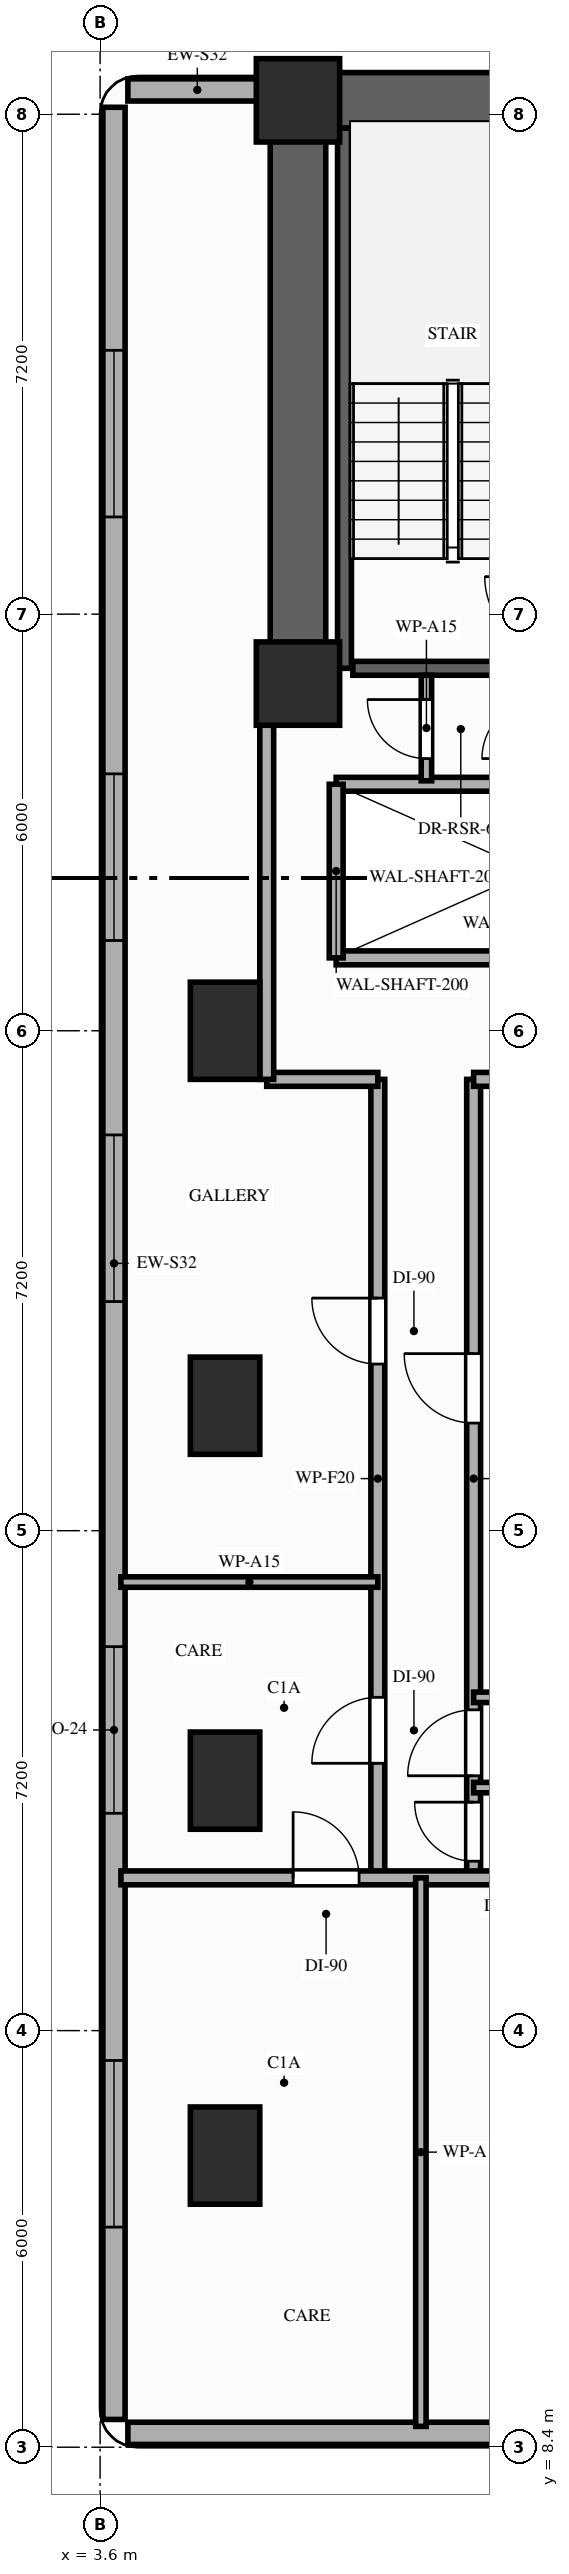
"""IFC4 building model, lengths in metres.
Left out: names, types, materials, properties, quantities, classifications, styles, units other than length and angle.
Written with IfcOpenShell. Run it as: python <this file> out.ifc"""

import sys

from ifc_helpers import new_model, si_unit, direction, frame, frame_2d, origin, origin_2d, place, context, subcontext, project, spatial, rectangle, extrude, element, fill, save


model = new_model("IFC4")
c1 = context("Model", 3, precision=1e-05, world=origin(), true_north=direction((0.0, 1.0)))
c2 = subcontext(c1, "Body", "Model", "MODEL_VIEW")
j1 = project(units=[si_unit("LENGTHUNIT", "METRE"), si_unit("PLANEANGLEUNIT", "RADIAN")], contexts=[c1])
p1 = place(None, origin())
s1 = spatial("IfcSite", under=j1, at=p1, CompositionType="ELEMENT")
p2 = place(p1, origin())
s2 = spatial("IfcBuilding", under=s1, at=p2, CompositionType="ELEMENT")
p3 = place(p2, frame((0.0, 0.0, 33.4)))
s3 = spatial("IfcBuildingStorey", under=s2, at=p3, CompositionType="ELEMENT", Elevation=33.4)
for number, where, z_axis, x_axis in (
    (1, (6.45, 33.8, 0.0), (0.0, 0.0, 1.0), (1.0, 0.0, 0.0)),
    (2, (6.45, 42.2, 0.0), (0.0, 0.0, 1.0), (1.0, 0.0, 0.0)),
):
    element("IfcColumn", number, at=place(p3, frame(where, z_axis=z_axis, x_axis=x_axis)), inside=s3, PredefinedType="COLUMN", context=c2, shape_type="SweptSolid", body=[
        extrude(rectangle(XDim=1.2, YDim=1.2, at=origin_2d()), origin(), (0.0, 0.0, 1.0), 3.2),
    ])
for number, where, z_axis, x_axis in (
    (3, (5.4, 12.6, 0.0), (0.0, 0.0, 1.0), (1.0, 0.0, 0.0)),
    (4, (5.4, 18.0, 0.0), (0.0, 0.0, 1.0), (1.0, 0.0, 0.0)),
    (5, (5.4, 23.4, 0.0), (0.0, 0.0, 1.0), (1.0, 0.0, 0.0)),
    (6, (5.4, 28.8, 0.0), (0.0, 0.0, 1.0), (1.0, 0.0, 0.0)),
):
    element("IfcColumn", number, at=place(p3, frame(where, z_axis=z_axis, x_axis=x_axis)), inside=s3, PredefinedType="COLUMN", context=c2, shape_type="SweptSolid", body=[
        extrude(rectangle(XDim=1.0, YDim=1.4, at=origin_2d()), origin(), (0.0, 0.0, 1.0), 3.2),
    ])
p4 = place(p3, frame((4.0, 8.6, 0.0), z_axis=(0.0, 0.0, 1.0), x_axis=(1.0, 0.0, 0.0)))
e7 = element("IfcWall", 7, at=p4, inside=s3, PredefinedType="STANDARD", context=c2, shape_type="SweptSolid", body=[
    extrude(rectangle(XDim=15.8, YDim=0.32, at=frame_2d((7.9, 0.0))), origin(), (0.0, 0.0, 1.0), 3.02),
])
p5 = place(p4, frame((11.2, 0.0, 0.85)))
e8 = element("IfcOpeningElement", 8, at=p5, cuts=e7, PredefinedType="OPENING", context=c2, shape_type="SweptSolid", body=[
    extrude(rectangle(XDim=2.4, YDim=1.8, at=frame_2d((1.2, 0.9))), frame((0.0, 0.17, 0.0), z_axis=(0.0, -1.0, 0.0), x_axis=(1.0, 0.0, 0.0)), (0.0, 0.0, 1.0), 0.34),
])
p6 = place(p3, frame((3.8, 42.1, 0.0), z_axis=(0.0, 0.0, 1.0), x_axis=(0.0, -1.0, 0.0)))
e9 = element("IfcWall", 9, at=p6, inside=s3, PredefinedType="STANDARD", context=c2, shape_type="SweptSolid", body=[
    extrude(rectangle(XDim=33.3, YDim=0.32, at=frame_2d((16.65, 0.0))), origin(), (0.0, 0.0, 1.0), 2.7),
])
p7 = place(p6, frame((22.17, 0.0, 0.85)))
e10 = element("IfcOpeningElement", 10, at=p7, cuts=e9, PredefinedType="OPENING", context=c2, shape_type="SweptSolid", body=[
    extrude(rectangle(XDim=2.4, YDim=1.6, at=frame_2d((1.2, 0.8))), frame((0.0, 0.17, 0.0), z_axis=(0.0, -1.0, 0.0), x_axis=(1.0, 0.0, 0.0)), (0.0, 0.0, 1.0), 0.34),
])
p8 = place(p6, frame((28.13, 0.0, 0.85)))
e11 = element("IfcOpeningElement", 11, at=p8, cuts=e9, PredefinedType="OPENING", context=c2, shape_type="SweptSolid", body=[
    extrude(rectangle(XDim=2.4, YDim=1.6, at=frame_2d((1.2, 0.8))), frame((0.0, 0.17, 0.0), z_axis=(0.0, -1.0, 0.0), x_axis=(1.0, 0.0, 0.0)), (0.0, 0.0, 1.0), 0.34),
])
p9 = place(p6, frame((14.8, 0.0, 0.85)))
e12 = element("IfcOpeningElement", 12, at=p9, cuts=e9, PredefinedType="OPENING", context=c2, shape_type="SweptSolid", body=[
    extrude(rectangle(XDim=2.4, YDim=1.6, at=frame_2d((1.2, 0.8))), frame((0.0, 0.17, 0.0), z_axis=(0.0, -1.0, 0.0), x_axis=(1.0, 0.0, 0.0)), (0.0, 0.0, 1.0), 0.34),
])
p10 = place(p6, frame((9.6, 0.0, 0.85)))
e13 = element("IfcOpeningElement", 13, at=p10, cuts=e9, PredefinedType="OPENING", context=c2, shape_type="SweptSolid", body=[
    extrude(rectangle(XDim=2.4, YDim=1.6, at=frame_2d((1.2, 0.8))), frame((0.0, 0.17, 0.0), z_axis=(0.0, -1.0, 0.0), x_axis=(1.0, 0.0, 0.0)), (0.0, 0.0, 1.0), 0.34),
])
p11 = place(p6, frame((3.5, 0.0, 0.85)))
e14 = element("IfcOpeningElement", 14, at=p11, cuts=e9, PredefinedType="OPENING", context=c2, shape_type="SweptSolid", body=[
    extrude(rectangle(XDim=2.4, YDim=1.6, at=frame_2d((1.2, 0.8))), frame((0.0, 0.17, 0.0), z_axis=(0.0, -1.0, 0.0), x_axis=(1.0, 0.0, 0.0)), (0.0, 0.0, 1.0), 0.34),
])
p12 = place(p3, frame((6.0, 42.35, 0.0), z_axis=(0.0, 0.0, 1.0), x_axis=(-1.0, 0.0, 0.0)))
e15 = element("IfcWall", 15, at=p12, inside=s3, PredefinedType="STANDARD", context=c2, shape_type="SweptSolid", body=[
    extrude(rectangle(XDim=2.0, YDim=0.32, at=frame_2d((1.0, 0.0))), origin(), (0.0, 0.0, 1.0), 3.02),
])
p13 = place(p3, frame((6.45, 42.2, 0.0), z_axis=(0.0, 0.0, 1.0), x_axis=(1.0, 0.0, 0.0)))
e16 = element("IfcWall", 16, at=p13, inside=s3, PredefinedType="SHEAR", context=c2, shape_type="SweptSolid", body=[
    extrude(rectangle(XDim=20.45, YDim=0.8, at=frame_2d((10.225, 0.0))), origin(), (0.0, 0.0, 1.0), 3.02),
])
p14 = place(p3, frame((6.45, 33.8, 0.0), z_axis=(0.0, 0.0, 1.0), x_axis=(0.0, 1.0, 0.0)))
e17 = element("IfcWall", 17, at=p14, inside=s3, PredefinedType="SHEAR", context=c2, shape_type="SweptSolid", body=[
    extrude(rectangle(XDim=7.95, YDim=0.8, at=frame_2d((3.975, 0.0))), origin(), (0.0, 0.0, 1.0), 3.02),
])
p15 = place(p3, frame((7.12, 34.02, 0.0), z_axis=(0.0, 0.0, 1.0), x_axis=(0.0, 1.0, 0.0)))
e18 = element("IfcWall", 18, at=p15, inside=s3, PredefinedType="SHEAR", context=c2, shape_type="SweptSolid", body=[
    extrude(rectangle(XDim=7.78, YDim=0.2, at=frame_2d((3.89, 0.0))), origin(), (0.0, 0.0, 1.0), 3.02),
])
p16 = place(p3, frame((7.24, 34.02, 0.0), z_axis=(0.0, 0.0, 1.0), x_axis=(1.0, 0.0, 0.0)))
e19 = element("IfcWall", 19, at=p16, inside=s3, PredefinedType="SHEAR", context=c2, shape_type="SweptSolid", body=[
    extrude(rectangle(XDim=2.88, YDim=0.2, at=frame_2d((1.44, 0.0))), origin(), (0.0, 0.0, 1.0), 3.02),
])
for number, where, z_axis, x_axis in (
    (20, (7.0, 29.85, 0.0), (0.0, 0.0, 1.0), (1.0, 0.0, 0.0)),
    (21, (7.0, 32.35, 0.0), (0.0, 0.0, 1.0), (1.0, 0.0, 0.0)),
):
    element("IfcWall", number, at=place(p3, frame(where, z_axis=z_axis, x_axis=x_axis)), inside=s3, PredefinedType="MOVABLE", context=c2, shape_type="SweptSolid", body=[
        extrude(rectangle(XDim=5.55, YDim=0.2, at=frame_2d((2.775, 0.0))), origin(), (0.0, 0.0, 1.0), 3.02),
    ])
p17 = place(p3, frame((7.0, 29.85, 0.0), z_axis=(0.0, 0.0, 1.0), x_axis=(0.0, 1.0, 0.0)))
e22 = element("IfcWall", 22, at=p17, inside=s3, PredefinedType="MOVABLE", context=c2, shape_type="SweptSolid", body=[
    extrude(rectangle(XDim=2.5, YDim=0.2, at=frame_2d((1.25, 0.0))), origin(), (0.0, 0.0, 1.0), 3.02),
])
p18 = place(p3, frame((8.3, 32.4, 0.0), z_axis=(0.0, 0.0, 1.0), x_axis=(0.0, 1.0, 0.0)))
e23 = element("IfcWall", 23, at=p18, inside=s3, PredefinedType="PARTITIONING", context=c2, shape_type="SweptSolid", body=[
    extrude(rectangle(XDim=1.52, YDim=0.15, at=frame_2d((0.76, 0.0))), origin(), (0.0, 0.0, 1.0), 2.4),
])
p19 = place(p18, frame((0.32, 0.0, 0.0)))
e24 = element("IfcOpeningElement", 24, at=p19, cuts=e23, PredefinedType="OPENING", context=c2, shape_type="SweptSolid", body=[
    extrude(rectangle(XDim=0.85, YDim=2.05, at=frame_2d((0.425, 1.025))), frame((0.0, 0.085, 0.0), z_axis=(0.0, -1.0, 0.0), x_axis=(1.0, 0.0, 0.0)), (0.0, 0.0, 1.0), 0.17),
])
p20 = place(p3, frame((7.6, 16.6, 0.0), z_axis=(0.0, 0.0, 1.0), x_axis=(0.0, 1.0, 0.0)))
e25 = element("IfcWall", 25, at=p20, inside=s3, PredefinedType="PARTITIONING", context=c2, shape_type="SweptSolid", body=[
    extrude(rectangle(XDim=11.5, YDim=0.2, at=frame_2d((5.75, 0.0))), origin(), (0.0, 0.0, 1.0), 2.4),
])
p21 = place(p20, frame((1.65, 0.0, 0.0)))
e26 = element("IfcOpeningElement", 26, at=p21, cuts=e25, PredefinedType="OPENING", context=c2, shape_type="SweptSolid", body=[
    extrude(rectangle(XDim=0.95, YDim=2.15, at=frame_2d((0.475, 1.075))), frame((0.0, 0.11, 0.0), z_axis=(0.0, -1.0, 0.0), x_axis=(1.0, 0.0, 0.0)), (0.0, 0.0, 1.0), 0.22),
])
p22 = place(p20, frame((7.4, 0.0, 0.0)))
e27 = element("IfcOpeningElement", 27, at=p22, cuts=e25, PredefinedType="OPENING", context=c2, shape_type="SweptSolid", body=[
    extrude(rectangle(XDim=0.95, YDim=2.15, at=frame_2d((0.475, 1.075))), frame((0.0, 0.11, 0.0), z_axis=(0.0, -1.0, 0.0), x_axis=(1.0, 0.0, 0.0)), (0.0, 0.0, 1.0), 0.22),
])
p23 = place(p3, frame((8.98, 16.6, 0.0), z_axis=(0.0, 0.0, 1.0), x_axis=(0.0, 1.0, 0.0)))
e28 = element("IfcWall", 28, at=p23, inside=s3, PredefinedType="PARTITIONING", context=c2, shape_type="SweptSolid", body=[
    extrude(rectangle(XDim=11.5, YDim=0.2, at=frame_2d((5.75, 0.0))), origin(), (0.0, 0.0, 1.0), 2.4),
])
p24 = place(p23, frame((0.24, 0.0, 0.0)))
e29 = element("IfcOpeningElement", 29, at=p24, cuts=e28, PredefinedType="OPENING", context=c2, shape_type="SweptSolid", body=[
    extrude(rectangle(XDim=0.85, YDim=2.1, at=frame_2d((0.425, 1.05))), frame((0.0, 0.11, 0.0), z_axis=(0.0, -1.0, 0.0), x_axis=(1.0, 0.0, 0.0)), (0.0, 0.0, 1.0), 0.22),
])
p25 = place(p23, frame((1.47, 0.0, 0.0)))
e30 = element("IfcOpeningElement", 30, at=p25, cuts=e28, PredefinedType="OPENING", context=c2, shape_type="SweptSolid", body=[
    extrude(rectangle(XDim=0.95, YDim=2.1, at=frame_2d((0.475, 1.05))), frame((0.0, 0.11, 0.0), z_axis=(0.0, -1.0, 0.0), x_axis=(1.0, 0.0, 0.0)), (0.0, 0.0, 1.0), 0.22),
])
p26 = place(p23, frame((6.55, 0.0, 0.0)))
e31 = element("IfcOpeningElement", 31, at=p26, cuts=e28, PredefinedType="OPENING", context=c2, shape_type="SweptSolid", body=[
    extrude(rectangle(XDim=1.0, YDim=2.15, at=frame_2d((0.5, 1.075))), frame((0.0, 0.11, 0.0), z_axis=(0.0, -1.0, 0.0), x_axis=(1.0, 0.0, 0.0)), (0.0, 0.0, 1.0), 0.22),
])
p27 = place(p3, frame((3.9, 16.6, 0.0), z_axis=(0.0, 0.0, 1.0), x_axis=(1.0, 0.0, 0.0)))
e32 = element("IfcWall", 32, at=p27, inside=s3, PredefinedType="PARTITIONING", context=c2, shape_type="SweptSolid", body=[
    extrude(rectangle(XDim=16.0, YDim=0.2, at=frame_2d((8.0, 0.0))), origin(), (0.0, 0.0, 1.0), 2.4),
])
p28 = place(p27, frame((2.48, 0.0, 0.0)))
e33 = element("IfcOpeningElement", 33, at=p28, cuts=e32, PredefinedType="OPENING", context=c2, shape_type="SweptSolid", body=[
    extrude(rectangle(XDim=0.95, YDim=2.15, at=frame_2d((0.475, 1.075))), frame((0.0, 0.11, 0.0), z_axis=(0.0, -1.0, 0.0), x_axis=(1.0, 0.0, 0.0)), (0.0, 0.0, 1.0), 0.22),
])
p29 = place(p27, frame((6.56, 0.0, 0.0)))
e34 = element("IfcOpeningElement", 34, at=p29, cuts=e32, PredefinedType="OPENING", context=c2, shape_type="SweptSolid", body=[
    extrude(rectangle(XDim=0.95, YDim=2.15, at=frame_2d((0.475, 1.075))), frame((0.0, 0.11, 0.0), z_axis=(0.0, -1.0, 0.0), x_axis=(1.0, 0.0, 0.0)), (0.0, 0.0, 1.0), 0.22),
])
p30 = place(p27, frame((12.4, 0.0, 0.0)))
e35 = element("IfcOpeningElement", 35, at=p30, cuts=e32, PredefinedType="OPENING", context=c2, shape_type="SweptSolid", body=[
    extrude(rectangle(XDim=0.95, YDim=2.15, at=frame_2d((0.475, 1.075))), frame((0.0, 0.11, 0.0), z_axis=(0.0, -1.0, 0.0), x_axis=(1.0, 0.0, 0.0)), (0.0, 0.0, 1.0), 0.22),
])
p31 = place(p3, frame((6.0, 28.1, 0.0), z_axis=(0.0, 0.0, 1.0), x_axis=(1.0, 0.0, 0.0)))
e36 = element("IfcWall", 36, at=p31, inside=s3, PredefinedType="PARTITIONING", context=c2, shape_type="SweptSolid", body=[
    extrude(rectangle(XDim=1.6, YDim=0.2, at=frame_2d((0.8, 0.0))), origin(), (0.0, 0.0, 1.0), 3.02),
])
p32 = place(p3, frame((6.0, 28.1, 0.0), z_axis=(0.0, 0.0, 1.0), x_axis=(0.0, 1.0, 0.0)))
e37 = element("IfcWall", 37, at=p32, inside=s3, PredefinedType="PARTITIONING", context=c2, shape_type="SweptSolid", body=[
    extrude(rectangle(XDim=5.58, YDim=0.2, at=frame_2d((2.79, 0.0))), origin(), (0.0, 0.0, 1.0), 2.4),
])
p33 = place(p3, frame((8.98, 28.1, 0.0), z_axis=(0.0, 0.0, 1.0), x_axis=(1.0, 0.0, 0.0)))
e38 = element("IfcWall", 38, at=p33, inside=s3, PredefinedType="PARTITIONING", context=c2, shape_type="SweptSolid", body=[
    extrude(rectangle(XDim=10.92, YDim=0.2, at=frame_2d((5.46, 0.0))), origin(), (0.0, 0.0, 1.0), 2.4),
])
p34 = place(p3, frame((3.9, 20.86, 0.0), z_axis=(0.0, 0.0, 1.0), x_axis=(1.0, 0.0, 0.0)))
e39 = element("IfcWall", 39, at=p34, inside=s3, PredefinedType="PARTITIONING", context=c2, shape_type="SweptSolid", body=[
    extrude(rectangle(XDim=3.7, YDim=0.15, at=frame_2d((1.85, 0.0))), origin(), (0.0, 0.0, 1.0), 2.4),
])
p35 = place(p3, frame((8.22, 8.7, 0.0), z_axis=(0.0, 0.0, 1.0), x_axis=(0.0, 1.0, 0.0)))
e40 = element("IfcWall", 40, at=p35, inside=s3, PredefinedType="PARTITIONING", context=c2, shape_type="SweptSolid", body=[
    extrude(rectangle(XDim=7.9, YDim=0.15, at=frame_2d((3.95, 0.0))), origin(), (0.0, 0.0, 1.0), 2.4),
])
for number, where, z_axis, x_axis in (
    (41, (8.98, 17.9, 0.0), (0.0, 0.0, 1.0), (1.0, 0.0, 0.0)),
    (42, (8.98, 19.2, 0.0), (0.0, 0.0, 1.0), (1.0, 0.0, 0.0)),
):
    element("IfcWall", number, at=place(p3, frame(where, z_axis=z_axis, x_axis=x_axis)), inside=s3, PredefinedType="PARTITIONING", context=c2, shape_type="SweptSolid", body=[
        extrude(rectangle(XDim=10.92, YDim=0.15, at=frame_2d((5.46, 0.0))), origin(), (0.0, 0.0, 1.0), 2.4),
    ])
p36 = place(p7, origin())
e43 = element("IfcWindow", 43, at=p36, inside=s3, PartitioningType="SINGLE_PANEL", PredefinedType="WINDOW", context=c2, shape_type="SweptSolid", body=[
    extrude(rectangle(XDim=2.4, YDim=1.6, at=frame_2d((1.2, 0.8))), frame((0.0, 0.03, 0.0), z_axis=(0.0, -1.0, 0.0), x_axis=(1.0, 0.0, 0.0)), (0.0, 0.0, 1.0), 0.06),
])
fill(e10, e43)
p37 = place(p8, origin())
e44 = element("IfcWindow", 44, at=p37, inside=s3, PartitioningType="SINGLE_PANEL", PredefinedType="WINDOW", context=c2, shape_type="SweptSolid", body=[
    extrude(rectangle(XDim=2.4, YDim=1.6, at=frame_2d((1.2, 0.8))), frame((0.0, 0.03, 0.0), z_axis=(0.0, -1.0, 0.0), x_axis=(1.0, 0.0, 0.0)), (0.0, 0.0, 1.0), 0.06),
])
fill(e11, e44)
p38 = place(p9, origin())
e45 = element("IfcWindow", 45, at=p38, inside=s3, PartitioningType="SINGLE_PANEL", PredefinedType="WINDOW", context=c2, shape_type="SweptSolid", body=[
    extrude(rectangle(XDim=2.4, YDim=1.6, at=frame_2d((1.2, 0.8))), frame((0.0, 0.03, 0.0), z_axis=(0.0, -1.0, 0.0), x_axis=(1.0, 0.0, 0.0)), (0.0, 0.0, 1.0), 0.06),
])
fill(e12, e45)
p39 = place(p10, origin())
e46 = element("IfcWindow", 46, at=p39, inside=s3, PartitioningType="SINGLE_PANEL", PredefinedType="WINDOW", context=c2, shape_type="SweptSolid", body=[
    extrude(rectangle(XDim=2.4, YDim=1.6, at=frame_2d((1.2, 0.8))), frame((0.0, 0.03, 0.0), z_axis=(0.0, -1.0, 0.0), x_axis=(1.0, 0.0, 0.0)), (0.0, 0.0, 1.0), 0.06),
])
fill(e13, e46)
p40 = place(p11, origin())
e47 = element("IfcWindow", 47, at=p40, inside=s3, PartitioningType="SINGLE_PANEL", PredefinedType="WINDOW", context=c2, shape_type="SweptSolid", body=[
    extrude(rectangle(XDim=2.4, YDim=1.6, at=frame_2d((1.2, 0.8))), frame((0.0, 0.03, 0.0), z_axis=(0.0, -1.0, 0.0), x_axis=(1.0, 0.0, 0.0)), (0.0, 0.0, 1.0), 0.06),
])
fill(e14, e47)
p41 = place(p19, origin())
e48 = element("IfcDoor", 48, at=p41, inside=s3, OperationType="SINGLE_SWING_RIGHT", PredefinedType="DOOR", context=c2, shape_type="SweptSolid", body=[
    extrude(rectangle(XDim=0.85, YDim=2.05, at=frame_2d((0.425, 1.025))), frame((0.0, 0.025, 0.0), z_axis=(0.0, -1.0, 0.0), x_axis=(1.0, 0.0, 0.0)), (0.0, 0.0, 1.0), 0.05),
])
fill(e24, e48)
p42 = place(p21, origin())
e49 = element("IfcDoor", 49, at=p42, inside=s3, OperationType="SINGLE_SWING_LEFT", PredefinedType="DOOR", context=c2, shape_type="SweptSolid", body=[
    extrude(rectangle(XDim=0.95, YDim=2.15, at=frame_2d((0.475, 1.075))), frame((0.0, 0.025, 0.0), z_axis=(0.0, -1.0, 0.0), x_axis=(1.0, 0.0, 0.0)), (0.0, 0.0, 1.0), 0.05),
])
fill(e26, e49)
p43 = place(p22, origin())
e50 = element("IfcDoor", 50, at=p43, inside=s3, OperationType="SINGLE_SWING_RIGHT", PredefinedType="DOOR", context=c2, shape_type="SweptSolid", body=[
    extrude(rectangle(XDim=0.95, YDim=2.15, at=frame_2d((0.475, 1.075))), frame((0.0, 0.025, 0.0), z_axis=(0.0, -1.0, 0.0), x_axis=(1.0, 0.0, 0.0)), (0.0, 0.0, 1.0), 0.05),
])
fill(e27, e50)
p44 = place(p28, origin())
e51 = element("IfcDoor", 51, at=p44, inside=s3, OperationType="SINGLE_SWING_LEFT", PredefinedType="DOOR", context=c2, shape_type="SweptSolid", body=[
    extrude(rectangle(XDim=0.95, YDim=2.15, at=frame_2d((0.475, 1.075))), frame((0.0, 0.025, 0.0), z_axis=(0.0, -1.0, 0.0), x_axis=(1.0, 0.0, 0.0)), (0.0, 0.0, 1.0), 0.05),
])
fill(e33, e51)
p45 = place(p24, origin())
e52 = element("IfcDoor", 52, at=p45, inside=s3, OperationType="SINGLE_SWING_RIGHT", PredefinedType="DOOR", context=c2, shape_type="SweptSolid", body=[
    extrude(rectangle(XDim=0.85, YDim=2.1, at=frame_2d((0.425, 1.05))), frame((0.0, 0.025, 0.0), z_axis=(0.0, -1.0, 0.0), x_axis=(1.0, 0.0, 0.0)), (0.0, 0.0, 1.0), 0.05),
])
fill(e29, e52)
p46 = place(p25, origin())
e53 = element("IfcDoor", 53, at=p46, inside=s3, OperationType="SINGLE_SWING_LEFT", PredefinedType="DOOR", context=c2, shape_type="SweptSolid", body=[
    extrude(rectangle(XDim=0.95, YDim=2.1, at=frame_2d((0.475, 1.05))), frame((0.0, 0.025, 0.0), z_axis=(0.0, -1.0, 0.0), x_axis=(1.0, 0.0, 0.0)), (0.0, 0.0, 1.0), 0.05),
])
fill(e30, e53)
p47 = place(p26, origin())
e54 = element("IfcDoor", 54, at=p47, inside=s3, OperationType="SINGLE_SWING_RIGHT", PredefinedType="DOOR", context=c2, shape_type="SweptSolid", body=[
    extrude(rectangle(XDim=1.0, YDim=2.15, at=frame_2d((0.5, 1.075))), frame((0.0, 0.025, 0.0), z_axis=(0.0, -1.0, 0.0), x_axis=(1.0, 0.0, 0.0)), (0.0, 0.0, 1.0), 0.05),
])
fill(e31, e54)
save(model, sys.argv[1])
